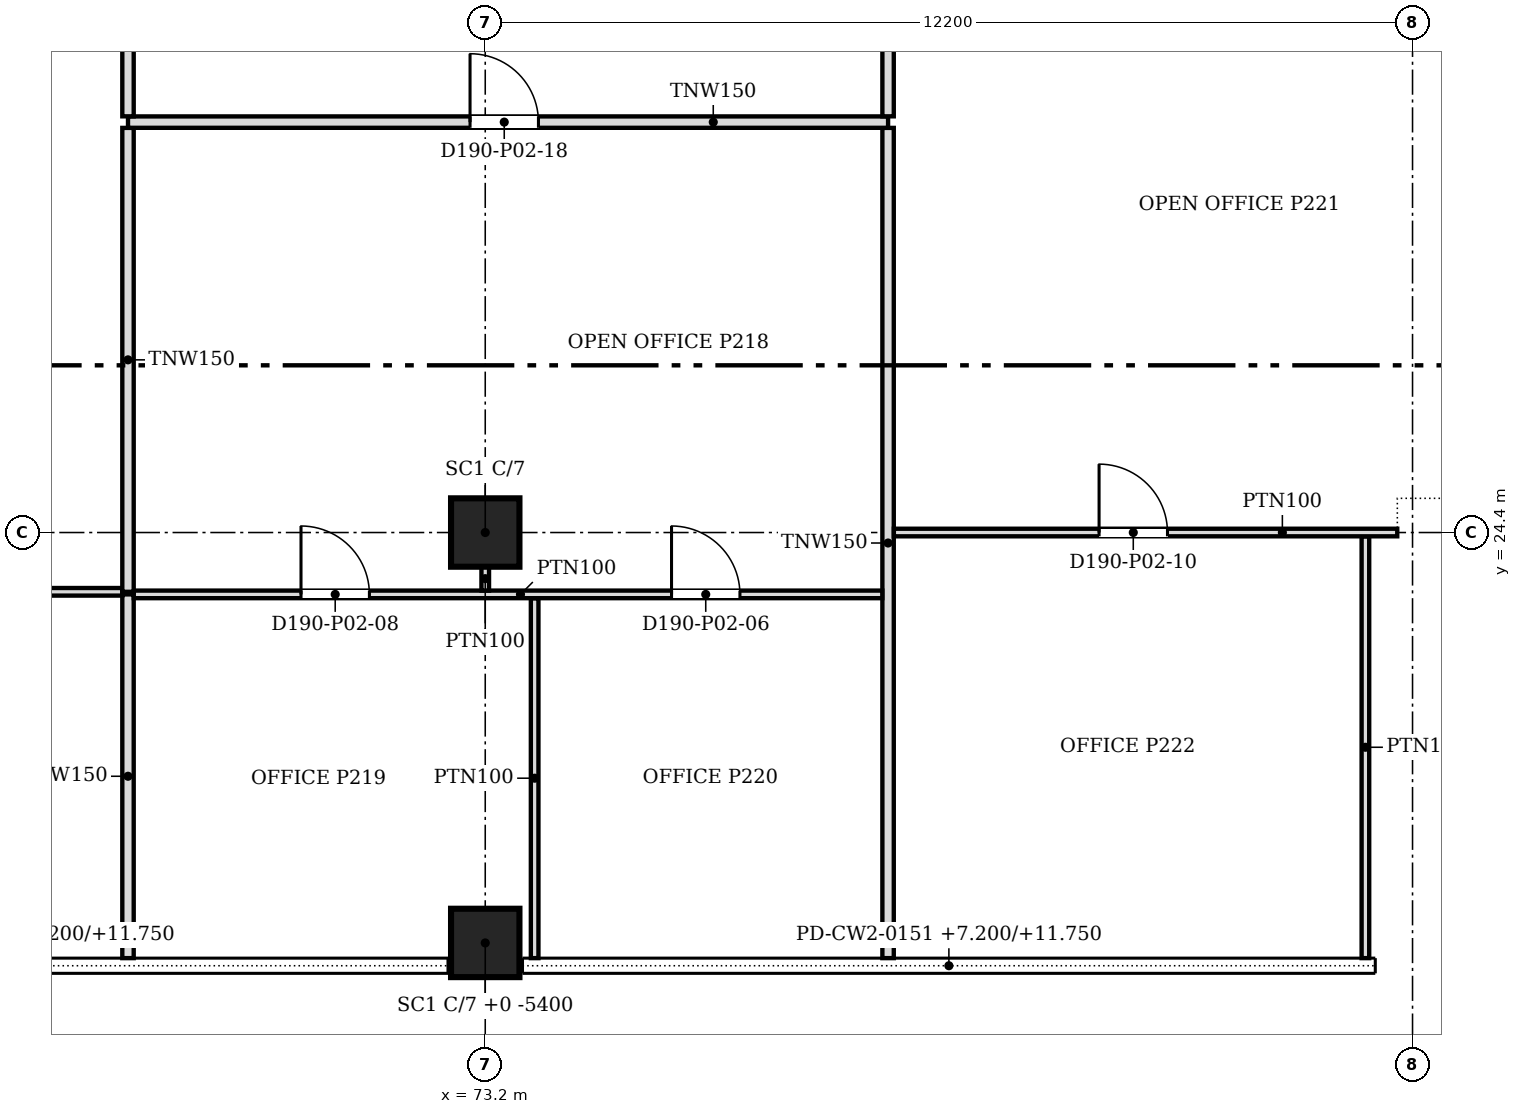
"""IFC4 building model, lengths in metres.
Left out: names, types, materials, properties, quantities, classifications, styles, units other than length and angle.
Written with IfcOpenShell. Run it as: python <this file> out.ifc"""

import sys

from ifc_helpers import new_model, si_unit, direction, frame, frame_2d, origin, origin_2d, place, context, subcontext, project, spatial, rectangle, extrude, source, transform, mapped, element, fill, save


model = new_model("IFC4")
c1 = context("Model", 3, precision=1e-05, world=origin(), true_north=direction((0.0, 1.0)))
c2 = subcontext(c1, "Body", "Model", "MODEL_VIEW")
j1 = project(units=[si_unit("LENGTHUNIT", "METRE"), si_unit("PLANEANGLEUNIT", "RADIAN")], contexts=[c1])
p1 = place(None, origin())
s1 = spatial("IfcSite", under=j1, at=p1, CompositionType="ELEMENT")
p2 = place(p1, origin())
s2 = spatial("IfcBuilding", under=s1, at=p2, CompositionType="ELEMENT")
p3 = place(p2, frame((0.0, 0.0, 7.2)))
s3 = spatial("IfcBuildingStorey", under=s2, at=p3, CompositionType="ELEMENT", Elevation=7.2)
for number, where, z_axis, x_axis in (
    (1, (85.65, 24.4, 0.0), (0.0, 0.0, 1.0), (1.0, 0.0, 0.0)),
    (2, (73.2, 24.4, 0.0), (0.0, 0.0, 1.0), (1.0, 0.0, 0.0)),
    (3, (73.2, 19.0, 0.0), (0.0, 0.0, 1.0), (1.0, 0.0, 0.0)),
    (4, (85.4, 19.0, 0.0), (0.0, 0.0, 1.0), (1.0, 0.0, 0.0)),
):
    element("IfcColumn", number, at=place(p3, frame(where, z_axis=z_axis, x_axis=x_axis)), inside=s3, PredefinedType="COLUMN", context=c2, shape_type="SweptSolid", body=[
        extrude(rectangle(XDim=0.9, YDim=0.9, at=origin_2d()), origin(), (0.0, 0.0, 1.0), 4.55),
    ])
p4 = place(p3, frame((68.5, 18.8, 0.0), z_axis=(0.0, 0.0, 1.0), x_axis=(0.0, 1.0, 0.0)))
e5 = element("IfcWall", 5, at=p4, inside=s3, PredefinedType="PARTITIONING", context=c2, shape_type="SweptSolid", body=[
    extrude(rectangle(XDim=4.786, YDim=0.15, at=frame_2d((2.393, 0.0))), origin(), (0.0, 0.0, 1.0), 3.715),
])
p5 = place(p3, frame((73.85, 18.8, 0.0), z_axis=(0.0, 0.0, 1.0), x_axis=(0.0, 1.0, 0.0)))
e6 = element("IfcWall", 6, at=p5, inside=s3, PredefinedType="PARTITIONING", context=c2, shape_type="SweptSolid", body=[
    extrude(rectangle(XDim=4.735, YDim=0.1, at=frame_2d((2.367, 0.0))), origin(), (0.0, 0.0, 1.0), 3.715),
])
p6 = place(p3, frame((78.5, 18.8, 0.0), z_axis=(0.0, 0.0, 1.0), x_axis=(0.0, 1.0, 0.0)))
e7 = element("IfcWall", 7, at=p6, inside=s3, PredefinedType="PARTITIONING", context=c2, shape_type="SweptSolid", body=[
    extrude(rectangle(XDim=10.924, YDim=0.15, at=frame_2d((5.462, 0.0))), origin(), (0.0, 0.0, 1.0), 3.715),
])
p7 = place(p3, frame((84.78, 18.8, 0.0), z_axis=(0.0, 0.0, 1.0), x_axis=(0.0, 1.0, 0.0)))
e8 = element("IfcWall", 8, at=p7, inside=s3, PredefinedType="PARTITIONING", context=c2, shape_type="SweptSolid", body=[
    extrude(rectangle(XDim=5.549, YDim=0.1, at=frame_2d((2.774, 0.0))), origin(), (0.0, 0.0, 1.0), 3.715),
])
p8 = place(p3, frame((86.281, 21.644, 0.0), z_axis=(0.0, 0.0, 1.0), x_axis=(-1.0, 0.0, 0.0)))
e9 = element("IfcWall", 9, at=p8, inside=s3, PredefinedType="PARTITIONING", context=c2, shape_type="SweptSolid", body=[
    extrude(rectangle(XDim=1.451, YDim=0.1, at=frame_2d((0.726, 0.0))), origin(), (0.0, 0.0, 1.0), 3.715),
])
p9 = place(p3, frame((78.424, 23.586, 0.0), z_axis=(0.0, 0.0, 1.0), x_axis=(-1.0, 0.0, 0.0)))
e10 = element("IfcWall", 10, at=p9, inside=s3, PredefinedType="PARTITIONING", context=c2, shape_type="SweptSolid", body=[
    extrude(rectangle(XDim=9.848, YDim=0.1, at=frame_2d((4.924, 0.0))), origin(), (0.0, 0.0, 1.0), 3.715),
])
m1 = source(origin(), c2, "Body", "SweptSolid", [
    extrude(rectangle(XDim=0.9, YDim=2.1, at=frame_2d((0.45, 1.05))), frame((0.0, 0.06, 0.0), z_axis=(0.0, -1.0, 0.0), x_axis=(1.0, 0.0, 0.0)), (0.0, 0.0, 1.0), 0.12),
])
p10 = place(p9, frame((1.873, 0.0, 0.0)))
e11 = element("IfcOpeningElement", 11, at=p10, cuts=e10, PredefinedType="OPENING", context=c2, shape_type="MappedRepresentation", body=[
    mapped(m1, transform((0.0, 0.0, 0.0), scale=1.0)),
])
p11 = place(p9, frame((6.748, 0.0, 0.0)))
e12 = element("IfcOpeningElement", 12, at=p11, cuts=e10, PredefinedType="OPENING", context=c2, shape_type="MappedRepresentation", body=[
    mapped(m1, transform((0.0, 0.0, 0.0), scale=1.0)),
])
p12 = place(p3, frame((68.424, 23.62, 0.0), z_axis=(0.0, 0.0, 1.0), x_axis=(-1.0, 0.0, 0.0)))
e13 = element("IfcWall", 13, at=p12, inside=s3, PredefinedType="PARTITIONING", context=c2, shape_type="SweptSolid", body=[
    extrude(rectangle(XDim=7.348, YDim=0.1, at=frame_2d((3.674, 0.0))), origin(), (0.0, 0.0, 1.0), 3.715),
])
p13 = place(p12, frame((3.248, 0.0, 0.0)))
e14 = element("IfcOpeningElement", 14, at=p13, cuts=e13, PredefinedType="OPENING", context=c2, shape_type="MappedRepresentation", body=[
    mapped(m1, transform((0.0, 0.0, 0.0), scale=1.0)),
])
p14 = place(p3, frame((68.5, 23.62, 0.0), z_axis=(0.0, 0.0, 1.0), x_axis=(0.0, 1.0, 0.0)))
e15 = element("IfcWall", 15, at=p14, inside=s3, PredefinedType="PARTITIONING", context=c2, shape_type="SweptSolid", body=[
    extrude(rectangle(XDim=6.104, YDim=0.15, at=frame_2d((3.052, 0.0))), origin(), (0.0, 0.0, 1.0), 3.715),
])
p15 = place(p3, frame((73.2, 23.95, 0.0), z_axis=(0.0, 0.0, 1.0), x_axis=(0.0, -1.0, 0.0)))
e16 = element("IfcWall", 16, at=p15, inside=s3, PredefinedType="PARTITIONING", context=c2, shape_type="SweptSolid", body=[
    extrude(rectangle(XDim=0.314, YDim=0.1, at=frame_2d((0.157, 0.0))), origin(), (0.0, 0.0, 1.0), 3.715),
])
p16 = place(p3, frame((85.199, 24.4, 0.0), z_axis=(0.0, 0.0, 1.0), x_axis=(-1.0, 0.0, 0.0)))
e17 = element("IfcWall", 17, at=p16, inside=s3, PredefinedType="PARTITIONING", context=c2, shape_type="SweptSolid", body=[
    extrude(rectangle(XDim=6.623, YDim=0.1, at=frame_2d((3.312, 0.0))), origin(), (0.0, 0.0, 1.0), 3.715),
])
p17 = place(p16, frame((3.023, 0.0, 0.0)))
e18 = element("IfcOpeningElement", 18, at=p17, cuts=e17, PredefinedType="OPENING", context=c2, shape_type="MappedRepresentation", body=[
    mapped(m1, transform((0.0, 0.0, 0.0), scale=1.0)),
])
p18 = place(p3, frame((78.5, 29.8, 0.0), z_axis=(0.0, 0.0, 1.0), x_axis=(-1.0, 0.0, 0.0)))
e19 = element("IfcWall", 19, at=p18, inside=s3, PredefinedType="PARTITIONING", context=c2, shape_type="SweptSolid", body=[
    extrude(rectangle(XDim=10.0, YDim=0.15, at=frame_2d((5.0, 0.0))), origin(), (0.0, 0.0, 1.0), 3.715),
])
m2 = source(origin(), c2, "Body", "SweptSolid", [
    extrude(rectangle(XDim=0.9, YDim=2.1, at=frame_2d((0.45, 1.05))), frame((0.0, 0.085, 0.0), z_axis=(0.0, -1.0, 0.0), x_axis=(1.0, 0.0, 0.0)), (0.0, 0.0, 1.0), 0.17),
])
p19 = place(p18, frame((4.6, 0.0, 0.0)))
e20 = element("IfcOpeningElement", 20, at=p19, cuts=e19, PredefinedType="OPENING", context=c2, shape_type="MappedRepresentation", body=[
    mapped(m2, transform((0.0, 0.0, 0.0), scale=1.0)),
])
for number, where, z_axis, x_axis in (
    (21, (68.5, 29.876, 0.0), (0.0, 0.0, 1.0), (0.0, 1.0, 0.0)),
    (22, (78.5, 29.876, 0.0), (0.0, 0.0, 1.0), (0.0, 1.0, 0.0)),
):
    element("IfcWall", number, at=place(p3, frame(where, z_axis=z_axis, x_axis=x_axis)), inside=s3, PredefinedType="PARTITIONING", context=c2, shape_type="SweptSolid", body=[
        extrude(rectangle(XDim=3.048, YDim=0.15, at=frame_2d((1.524, 0.0))), origin(), (0.0, 0.0, 1.0), 3.715),
    ])
m3 = source(origin(), c2, "Body", "SweptSolid", [
    extrude(rectangle(XDim=0.9, YDim=2.1, at=frame_2d((0.45, 1.05))), frame((0.0, 0.025, 0.0), z_axis=(0.0, -1.0, 0.0), x_axis=(1.0, 0.0, 0.0)), (0.0, 0.0, 1.0), 0.05),
])
p20 = place(p10, origin())
e23 = element("IfcDoor", 23, at=p20, inside=s3, OperationType="SINGLE_SWING_RIGHT", PredefinedType="DOOR", context=c2, shape_type="MappedRepresentation", body=[
    mapped(m3, transform((0.0, 0.0, 0.0), scale=1.0)),
])
fill(e11, e23)
p21 = place(p11, origin())
e24 = element("IfcDoor", 24, at=p21, inside=s3, OperationType="SINGLE_SWING_RIGHT", PredefinedType="DOOR", context=c2, shape_type="MappedRepresentation", body=[
    mapped(m3, transform((0.0, 0.0, 0.0), scale=1.0)),
])
fill(e12, e24)
p22 = place(p17, origin())
e25 = element("IfcDoor", 25, at=p22, inside=s3, OperationType="SINGLE_SWING_RIGHT", PredefinedType="DOOR", context=c2, shape_type="MappedRepresentation", body=[
    mapped(m3, transform((0.0, 0.0, 0.0), scale=1.0)),
])
fill(e18, e25)
p23 = place(p19, origin())
e26 = element("IfcDoor", 26, at=p23, inside=s3, OperationType="SINGLE_SWING_RIGHT", PredefinedType="DOOR", context=c2, shape_type="MappedRepresentation", body=[
    mapped(m3, transform((0.0, 0.0, 0.0), scale=1.0)),
])
fill(e20, e26)
save(model, sys.argv[1])
